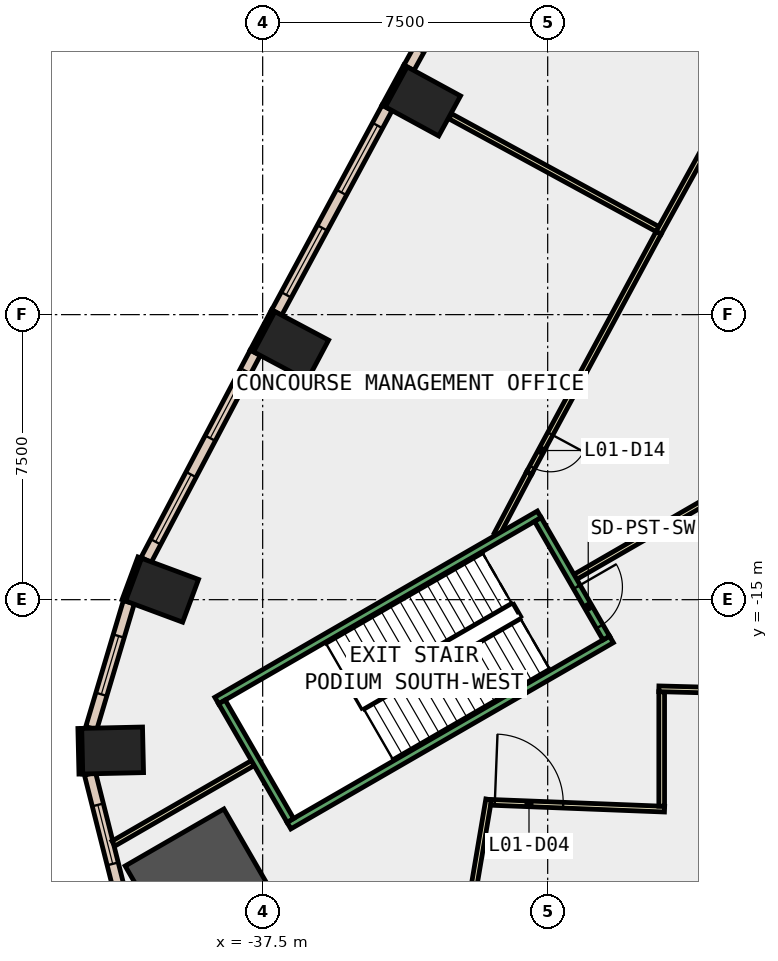
"""IFC4 building model, lengths in metres.
Left out: names, types, materials, properties, quantities, classifications, styles, units other than length and angle.
Written with IfcOpenShell. Run it as: python <this file> out.ifc"""

import sys

from ifc_helpers import new_model, si_unit, direction, frame, frame_2d, origin, origin_2d, place, context, subcontext, project, spatial, rectangle, extrude, element, fill, save


model = new_model("IFC4")
c1 = context("Model", 3, precision=1e-05, world=origin(), true_north=direction((0.0, 1.0)))
c2 = subcontext(c1, "Body", "Model", "MODEL_VIEW")
j1 = project(units=[si_unit("LENGTHUNIT", "METRE"), si_unit("PLANEANGLEUNIT", "RADIAN")], contexts=[c1])
p1 = place(None, origin())
s1 = spatial("IfcSite", under=j1, at=p1, CompositionType="ELEMENT")
p2 = place(p1, origin())
s2 = spatial("IfcBuilding", under=s1, at=p2, CompositionType="ELEMENT")
p3 = place(p2, frame((0.0, 0.0, 9.0)))
s3 = spatial("IfcBuildingStorey", under=s2, at=p3, CompositionType="ELEMENT", Elevation=9.0)
for number, where, z_axis, x_axis in (
    (1, (-33.283, -1.889, -0.45), (0.0, 0.0, 1.0), (0.478, 0.878, 0.0)),
    (2, (-36.753, -8.325, -0.45), (0.0, 0.0, 1.0), (0.469, 0.883, 0.0)),
    (3, (-40.147, -14.751, -0.45), (0.0, 0.0, 1.0), (0.348, 0.937, 0.0)),
    (4, (-41.448, -18.969, -0.45), (0.0, 0.0, 1.0), (-0.023, 1.0, 0.0)),
):
    element("IfcColumn", number, at=place(p3, frame(where, z_axis=z_axis, x_axis=x_axis)), inside=s3, PredefinedType="COLUMN", context=c2, shape_type="SweptSolid", body=[
        extrude(rectangle(XDim=1.2, YDim=1.6, at=origin_2d()), origin(), (0.0, 0.0, 1.0), 6.0),
    ])
p4 = place(p3, frame((-39.069, -22.556, -0.45), z_axis=(0.0, 0.0, 1.0), x_axis=(0.866025403784, 0.5, 0.0)))
e5 = element("IfcColumn", 5, at=p4, inside=s3, PredefinedType="COLUMN", context=c2, shape_type="SweptSolid", body=[
    extrude(rectangle(XDim=3.0, YDim=3.0, at=origin_2d()), origin(), (0.0, 0.0, 1.0), 6.0),
])
p5 = place(p3, frame((-33.742, -0.956, 0.0), z_axis=(0.0, 0.0, 1.0), x_axis=(-0.478267644701, -0.878214131082, 0.0)))
e6 = element("IfcWall", 6, at=p5, inside=s3, PredefinedType="STANDARD", context=c2, shape_type="SweptSolid", body=[
    extrude(rectangle(XDim=1.2, YDim=0.1, at=frame_2d((0.6, 0.0))), origin(), (0.0, 0.0, 1.0), 5.55),
])
p6 = place(p3, frame((-37.222, -7.397, 0.0), z_axis=(0.0, 0.0, 1.0), x_axis=(-0.469383408131, -0.882994459876, 0.0)))
e7 = element("IfcWall", 7, at=p6, inside=s3, PredefinedType="STANDARD", context=c2, shape_type="SweptSolid", body=[
    extrude(rectangle(XDim=1.199, YDim=0.1, at=frame_2d((0.6, 0.0))), origin(), (0.0, 0.0, 1.0), 5.55),
])
for number, where, z_axis, x_axis in (
    (8, (-40.735, -13.893, 0.0), (0.0, 0.0, 1.0), (-0.348, -0.937, 0.0)),
    (9, (-42.312, -18.388, 0.0), (0.0, 0.0, 1.0), (0.023, -1.0, 0.0)),
):
    element("IfcWall", number, at=place(p3, frame(where, z_axis=z_axis, x_axis=x_axis)), inside=s3, PredefinedType="STANDARD", context=c2, shape_type="SweptSolid", body=[
        extrude(rectangle(XDim=1.2, YDim=0.1, at=frame_2d((0.6, 0.0))), origin(), (0.0, 0.0, 1.0), 5.55),
    ])
p7 = place(p3, frame((-30.694, 4.353, 0.0), z_axis=(0.0, 0.0, 1.0), x_axis=(-0.483233380559, -0.875491576152, 0.0)))
e10 = element("IfcWall", 10, at=p7, inside=s3, PredefinedType="STANDARD", context=c2, shape_type="SweptSolid", body=[
    extrude(rectangle(XDim=6.121, YDim=0.3, at=frame_2d((3.061, 0.0))), origin(), (0.0, 0.0, 1.0), 5.55),
])
p8 = place(p7, frame((0.53, 0.0, 1.0)))
e11 = element("IfcOpeningElement", 11, at=p8, cuts=e10, PredefinedType="OPENING", context=c2, shape_type="SweptSolid", body=[
    extrude(rectangle(XDim=2.0, YDim=4.0, at=frame_2d((1.0, 2.0))), frame((0.0, 0.16, 0.0), z_axis=(0.0, -1.0, 0.0), x_axis=(1.0, 0.0, 0.0)), (0.0, 0.0, 1.0), 0.32),
])
p9 = place(p7, frame((3.591, 0.0, 1.0)))
e12 = element("IfcOpeningElement", 12, at=p9, cuts=e10, PredefinedType="OPENING", context=c2, shape_type="SweptSolid", body=[
    extrude(rectangle(XDim=2.0, YDim=4.0, at=frame_2d((1.0, 2.0))), frame((0.0, 0.16, 0.0), z_axis=(0.0, -1.0, 0.0), x_axis=(1.0, 0.0, 0.0)), (0.0, 0.0, 1.0), 0.32),
])
p10 = place(p3, frame((-34.226, -2.058, 0.0), z_axis=(0.0, 0.0, 1.0), x_axis=(-0.474584950749, -0.880209704856, 0.0)))
e13 = element("IfcWall", 13, at=p10, inside=s3, PredefinedType="STANDARD", context=c2, shape_type="SweptSolid", body=[
    extrude(rectangle(XDim=6.121, YDim=0.3, at=frame_2d((3.061, 0.0))), origin(), (0.0, 0.0, 1.0), 5.55),
])
p11 = place(p10, frame((0.53, 0.0, 1.0)))
e14 = element("IfcOpeningElement", 14, at=p11, cuts=e13, PredefinedType="OPENING", context=c2, shape_type="SweptSolid", body=[
    extrude(rectangle(XDim=2.0, YDim=4.0, at=frame_2d((1.0, 2.0))), frame((0.0, 0.16, 0.0), z_axis=(0.0, -1.0, 0.0), x_axis=(1.0, 0.0, 0.0)), (0.0, 0.0, 1.0), 0.32),
])
p12 = place(p10, frame((3.591, 0.0, 1.0)))
e15 = element("IfcOpeningElement", 15, at=p12, cuts=e13, PredefinedType="OPENING", context=c2, shape_type="SweptSolid", body=[
    extrude(rectangle(XDim=2.0, YDim=4.0, at=frame_2d((1.0, 2.0))), frame((0.0, 0.16, 0.0), z_axis=(0.0, -1.0, 0.0), x_axis=(1.0, 0.0, 0.0)), (0.0, 0.0, 1.0), 0.32),
])
p13 = place(p3, frame((-37.695, -8.503, 0.0), z_axis=(0.0, 0.0, 1.0), x_axis=(-0.466125129602, -0.884718804792, 0.0)))
e16 = element("IfcWall", 16, at=p13, inside=s3, PredefinedType="STANDARD", context=c2, shape_type="SweptSolid", body=[
    extrude(rectangle(XDim=6.164, YDim=0.3, at=frame_2d((3.082, 0.0))), origin(), (0.0, 0.0, 1.0), 5.55),
])
p14 = place(p13, frame((0.541, 0.0, 1.0)))
e17 = element("IfcOpeningElement", 17, at=p14, cuts=e16, PredefinedType="OPENING", context=c2, shape_type="SweptSolid", body=[
    extrude(rectangle(XDim=2.0, YDim=4.0, at=frame_2d((1.0, 2.0))), frame((0.0, 0.16, 0.0), z_axis=(0.0, -1.0, 0.0), x_axis=(1.0, 0.0, 0.0)), (0.0, 0.0, 1.0), 0.32),
])
p15 = place(p13, frame((3.623, 0.0, 1.0)))
e18 = element("IfcOpeningElement", 18, at=p15, cuts=e16, PredefinedType="OPENING", context=c2, shape_type="SweptSolid", body=[
    extrude(rectangle(XDim=2.0, YDim=4.0, at=frame_2d((1.0, 2.0))), frame((0.0, 0.16, 0.0), z_axis=(0.0, -1.0, 0.0), x_axis=(1.0, 0.0, 0.0)), (0.0, 0.0, 1.0), 0.32),
])
p16 = place(p3, frame((-41.022, -15.066, 0.0), z_axis=(0.0, 0.0, 1.0), x_axis=(-0.285800575124, -0.958289116738, 0.0)))
e19 = element("IfcWall", 19, at=p16, inside=s3, PredefinedType="STANDARD", context=c2, shape_type="SweptSolid", body=[
    extrude(rectangle(XDim=3.46, YDim=0.3, at=frame_2d((1.73, 0.0))), origin(), (0.0, 0.0, 1.0), 5.55),
])
p17 = place(p16, frame((0.93, 0.0, 1.0)))
e20 = element("IfcOpeningElement", 20, at=p17, cuts=e19, PredefinedType="OPENING", context=c2, shape_type="SweptSolid", body=[
    extrude(rectangle(XDim=1.6, YDim=4.0, at=frame_2d((0.8, 2.0))), frame((0.0, 0.16, 0.0), z_axis=(0.0, -1.0, 0.0), x_axis=(1.0, 0.0, 0.0)), (0.0, 0.0, 1.0), 0.32),
])
p18 = place(p3, frame((-42.044, -19.581, 0.0), z_axis=(0.0, 0.0, 1.0), x_axis=(0.244315836028, -0.969695711172, 0.0)))
e21 = element("IfcWall", 21, at=p18, inside=s3, PredefinedType="STANDARD", context=c2, shape_type="SweptSolid", body=[
    extrude(rectangle(XDim=3.291, YDim=0.3, at=frame_2d((1.645, 0.0))), origin(), (0.0, 0.0, 1.0), 5.55),
])
p19 = place(p18, frame((0.845, 0.0, 1.0)))
e22 = element("IfcOpeningElement", 22, at=p19, cuts=e21, PredefinedType="OPENING", context=c2, shape_type="SweptSolid", body=[
    extrude(rectangle(XDim=1.6, YDim=4.0, at=frame_2d((0.8, 2.0))), frame((0.0, 0.16, 0.0), z_axis=(0.0, -1.0, 0.0), x_axis=(1.0, 0.0, 0.0)), (0.0, 0.0, 1.0), 0.32),
])
p20 = place(p3, frame((-32.625, -26.588, 0.0), z_axis=(0.0, 0.0, 1.0), x_axis=(0.16693222012, 0.985968373674, 0.0)))
e23 = element("IfcWall", 23, at=p20, inside=s3, PredefinedType="PARTITIONING", context=c2, shape_type="SweptSolid", body=[
    extrude(rectangle(XDim=6.422, YDim=0.15, at=frame_2d((3.211, 0.0))), origin(), (0.0, 0.0, 1.0), 5.55),
])
p21 = place(p3, frame((-31.491, -20.333, 0.0), z_axis=(0.0, 0.0, 1.0), x_axis=(0.99923281192, -0.039163600211, 0.0)))
e24 = element("IfcWall", 24, at=p21, inside=s3, PredefinedType="PARTITIONING", context=c2, shape_type="SweptSolid", body=[
    extrude(rectangle(XDim=4.569, YDim=0.15, at=frame_2d((2.285, 0.0))), origin(), (0.0, 0.0, 1.0), 5.55),
])
p22 = place(p21, frame((0.1, 0.0, 0.0)))
e25 = element("IfcOpeningElement", 25, at=p22, cuts=e24, PredefinedType="OPENING", context=c2, shape_type="SweptSolid", body=[
    extrude(rectangle(XDim=1.8, YDim=2.1, at=frame_2d((0.9, 1.05))), frame((0.0, 0.085, 0.0), z_axis=(0.0, -1.0, 0.0), x_axis=(1.0, 0.0, 0.0)), (0.0, 0.0, 1.0), 0.17),
])
p23 = place(p3, frame((-27.0, -20.434, 0.0), z_axis=(0.0, 0.0, 1.0), x_axis=(0.0, 1.0, 0.0)))
e26 = element("IfcWall", 26, at=p23, inside=s3, PredefinedType="PARTITIONING", context=c2, shape_type="SweptSolid", body=[
    extrude(rectangle(XDim=3.012, YDim=0.15, at=frame_2d((1.506, 0.0))), origin(), (0.0, 0.0, 1.0), 5.55),
])
p24 = place(p3, frame((-27.075, -17.345, 0.0), z_axis=(0.0, 0.0, 1.0), x_axis=(0.999650499667, -0.026436310543, 0.0)))
e27 = element("IfcWall", 27, at=p24, inside=s3, PredefinedType="PARTITIONING", context=c2, shape_type="SweptSolid", body=[
    extrude(rectangle(XDim=8.321, YDim=0.15, at=frame_2d((4.16, 0.0))), origin(), (0.0, 0.0, 1.0), 5.55),
])
p25 = place(p3, frame((-27.047, -5.284, 0.0), z_axis=(0.0, 0.0, 1.0), x_axis=(-0.878278583626, 0.478149275377, 0.0)))
e28 = element("IfcWall", 28, at=p25, inside=s3, PredefinedType="PARTITIONING", context=c2, shape_type="SweptSolid", body=[
    extrude(rectangle(XDim=6.28, YDim=0.15, at=frame_2d((3.14, 0.0))), origin(), (0.0, 0.0, 1.0), 5.55),
])
p26 = place(p3, frame((-23.55, 1.051, 0.0), z_axis=(0.0, 0.0, 1.0), x_axis=(-0.48321416161, -0.875502183903, 0.0)))
e29 = element("IfcWall", 29, at=p26, inside=s3, PredefinedType="PARTITIONING", context=c2, shape_type="SweptSolid", body=[
    extrude(rectangle(XDim=7.311, YDim=0.15, at=frame_2d((3.656, 0.0))), origin(), (0.0, 0.0, 1.0), 5.55),
])
p27 = place(p26, frame((0.1, 0.0, 0.0)))
e30 = element("IfcOpeningElement", 30, at=p27, cuts=e29, PredefinedType="OPENING", context=c2, shape_type="SweptSolid", body=[
    extrude(rectangle(XDim=1.8, YDim=2.1, at=frame_2d((0.9, 1.05))), frame((0.0, 0.085, 0.0), z_axis=(0.0, -1.0, 0.0), x_axis=(1.0, 0.0, 0.0)), (0.0, 0.0, 1.0), 0.17),
])
p28 = place(p3, frame((-27.082, -5.35, 0.0), z_axis=(0.0, 0.0, 1.0), x_axis=(-0.474653615955, -0.880172679002, 0.0)))
e31 = element("IfcWall", 31, at=p28, inside=s3, PredefinedType="PARTITIONING", context=c2, shape_type="SweptSolid", body=[
    extrude(rectangle(XDim=7.176, YDim=0.15, at=frame_2d((3.588, 0.0))), origin(), (0.0, 0.0, 1.0), 5.55),
])
p29 = place(p28, frame((6.005, 0.0, 0.0)))
e32 = element("IfcOpeningElement", 32, at=p29, cuts=e31, PredefinedType="OPENING", context=c2, shape_type="SweptSolid", body=[
    extrude(rectangle(XDim=1.0, YDim=2.1, at=frame_2d((0.5, 1.05))), frame((0.0, 0.085, 0.0), z_axis=(0.0, -1.0, 0.0), x_axis=(1.0, 0.0, 0.0)), (0.0, 0.0, 1.0), 0.17),
])
p30 = place(p3, frame((-30.488, -11.666, 0.0), z_axis=(0.0, 0.0, 1.0), x_axis=(-0.466164290517, -0.884698171269, 0.0)))
e33 = element("IfcWall", 33, at=p30, inside=s3, PredefinedType="PARTITIONING", context=c2, shape_type="SweptSolid", body=[
    extrude(rectangle(XDim=1.83, YDim=0.15, at=frame_2d((0.915, 0.0))), origin(), (0.0, 0.0, 1.0), 5.55),
])
p31 = place(p3, frame((-37.759, -19.3, 0.0), z_axis=(0.0, 0.0, 1.0), x_axis=(-0.866003200133, -0.500038455881, 0.0)))
e34 = element("IfcWall", 34, at=p31, inside=s3, PredefinedType="PARTITIONING", context=c2, shape_type="SweptSolid", body=[
    extrude(rectangle(XDim=4.236, YDim=0.15, at=frame_2d((2.118, 0.0))), origin(), (0.0, 0.0, 1.0), 5.55),
])
p32 = place(p3, frame((-10.392, -3.5, 0.0), z_axis=(0.0, 0.0, 1.0), x_axis=(-0.866033409894, -0.499986132754, 0.0)))
e35 = element("IfcWall", 35, at=p32, inside=s3, PredefinedType="PARTITIONING", context=c2, shape_type="SweptSolid", body=[
    extrude(rectangle(XDim=21.8, YDim=0.15, at=frame_2d((10.9, 0.0))), origin(), (0.0, 0.0, 1.0), 5.55),
])
p33 = place(p32, frame((10.08, 0.0, 0.0)))
e36 = element("IfcOpeningElement", 36, at=p33, cuts=e35, PredefinedType="OPENING", context=c2, shape_type="SweptSolid", body=[
    extrude(rectangle(XDim=1.8, YDim=2.1, at=frame_2d((0.9, 1.05))), frame((0.0, 0.085, 0.0), z_axis=(0.0, -1.0, 0.0), x_axis=(1.0, 0.0, 0.0)), (0.0, 0.0, 1.0), 0.17),
])
for number, where, z_axis, x_axis in (
    (37, (-30.222, -12.755, 0.0), (0.0, 0.0, 1.0), (-0.866, -0.5, 0.0)),
    (38, (-28.322, -16.045, 0.0), (0.0, 0.0, 1.0), (-0.866, -0.5, 0.0)),
):
    element("IfcWall", number, at=place(p3, frame(where, z_axis=z_axis, x_axis=x_axis)), inside=s3, PredefinedType="STANDARD", context=c2, shape_type="SweptSolid", body=[
        extrude(rectangle(XDim=9.8, YDim=0.2, at=frame_2d((4.9, 0.0))), origin(), (0.0, 0.0, 1.0), 5.55),
    ])
p34 = place(p3, frame((-30.258, -12.891, 0.0), z_axis=(0.0, 0.0, 1.0), x_axis=(0.499982693035, -0.866035395735, 0.0)))
e39 = element("IfcWall", 39, at=p34, inside=s3, PredefinedType="STANDARD", context=c2, shape_type="SweptSolid", body=[
    extrude(rectangle(XDim=3.6, YDim=0.2, at=frame_2d((1.8, 0.0))), origin(), (0.0, 0.0, 1.0), 5.55),
])
p35 = place(p34, frame((2.05, 0.0, 0.0)))
e40 = element("IfcOpeningElement", 40, at=p35, cuts=e39, PredefinedType="OPENING", context=c2, shape_type="SweptSolid", body=[
    extrude(rectangle(XDim=1.2, YDim=2.2, at=frame_2d((0.6, 1.1))), frame((0.0, 0.11, 0.0), z_axis=(0.0, -1.0, 0.0), x_axis=(1.0, 0.0, 0.0)), (0.0, 0.0, 1.0), 0.22),
])
p36 = place(p3, frame((-38.572, -17.691, 0.0), z_axis=(0.0, 0.0, 1.0), x_axis=(0.49995333141, -0.866052346231, 0.0)))
e41 = element("IfcWall", 41, at=p36, inside=s3, PredefinedType="STANDARD", context=c2, shape_type="SweptSolid", body=[
    extrude(rectangle(XDim=3.6, YDim=0.2, at=frame_2d((1.8, 0.0))), origin(), (0.0, 0.0, 1.0), 5.55),
])
p37 = place(p11, origin())
e42 = element("IfcWindow", 42, at=p37, inside=s3, PartitioningType="SINGLE_PANEL", PredefinedType="WINDOW", context=c2, shape_type="SweptSolid", body=[
    extrude(rectangle(XDim=2.0, YDim=4.0, at=frame_2d((1.0, 2.0))), frame((0.0, 0.03, 0.0), z_axis=(0.0, -1.0, 0.0), x_axis=(1.0, 0.0, 0.0)), (0.0, 0.0, 1.0), 0.06),
])
fill(e14, e42)
p38 = place(p12, origin())
e43 = element("IfcWindow", 43, at=p38, inside=s3, PartitioningType="SINGLE_PANEL", PredefinedType="WINDOW", context=c2, shape_type="SweptSolid", body=[
    extrude(rectangle(XDim=2.0, YDim=4.0, at=frame_2d((1.0, 2.0))), frame((0.0, 0.03, 0.0), z_axis=(0.0, -1.0, 0.0), x_axis=(1.0, 0.0, 0.0)), (0.0, 0.0, 1.0), 0.06),
])
fill(e15, e43)
p39 = place(p14, origin())
e44 = element("IfcWindow", 44, at=p39, inside=s3, PartitioningType="SINGLE_PANEL", PredefinedType="WINDOW", context=c2, shape_type="SweptSolid", body=[
    extrude(rectangle(XDim=2.0, YDim=4.0, at=frame_2d((1.0, 2.0))), frame((0.0, 0.03, 0.0), z_axis=(0.0, -1.0, 0.0), x_axis=(1.0, 0.0, 0.0)), (0.0, 0.0, 1.0), 0.06),
])
fill(e17, e44)
p40 = place(p15, origin())
e45 = element("IfcWindow", 45, at=p40, inside=s3, PartitioningType="SINGLE_PANEL", PredefinedType="WINDOW", context=c2, shape_type="SweptSolid", body=[
    extrude(rectangle(XDim=2.0, YDim=4.0, at=frame_2d((1.0, 2.0))), frame((0.0, 0.03, 0.0), z_axis=(0.0, -1.0, 0.0), x_axis=(1.0, 0.0, 0.0)), (0.0, 0.0, 1.0), 0.06),
])
fill(e18, e45)
p41 = place(p17, origin())
e46 = element("IfcWindow", 46, at=p41, inside=s3, PartitioningType="SINGLE_PANEL", PredefinedType="WINDOW", context=c2, shape_type="SweptSolid", body=[
    extrude(rectangle(XDim=1.6, YDim=4.0, at=frame_2d((0.8, 2.0))), frame((0.0, 0.03, 0.0), z_axis=(0.0, -1.0, 0.0), x_axis=(1.0, 0.0, 0.0)), (0.0, 0.0, 1.0), 0.06),
])
fill(e20, e46)
p42 = place(p19, origin())
e47 = element("IfcWindow", 47, at=p42, inside=s3, PartitioningType="SINGLE_PANEL", PredefinedType="WINDOW", context=c2, shape_type="SweptSolid", body=[
    extrude(rectangle(XDim=1.6, YDim=4.0, at=frame_2d((0.8, 2.0))), frame((0.0, 0.03, 0.0), z_axis=(0.0, -1.0, 0.0), x_axis=(1.0, 0.0, 0.0)), (0.0, 0.0, 1.0), 0.06),
])
fill(e22, e47)
p43 = place(p22, origin())
e48 = element("IfcDoor", 48, at=p43, inside=s3, OperationType="DOUBLE_DOOR_SINGLE_SWING", PredefinedType="DOOR", context=c2, shape_type="SweptSolid", body=[
    extrude(rectangle(XDim=1.8, YDim=2.1, at=frame_2d((0.9, 1.05))), frame((0.0, 0.025, 0.0), z_axis=(0.0, -1.0, 0.0), x_axis=(1.0, 0.0, 0.0)), (0.0, 0.0, 1.0), 0.05),
])
fill(e25, e48)
p44 = place(p29, origin())
e49 = element("IfcDoor", 49, at=p44, inside=s3, OperationType="SINGLE_SWING_LEFT", PredefinedType="DOOR", context=c2, shape_type="SweptSolid", body=[
    extrude(rectangle(XDim=1.0, YDim=2.1, at=frame_2d((0.5, 1.05))), frame((0.0, 0.025, 0.0), z_axis=(0.0, -1.0, 0.0), x_axis=(1.0, 0.0, 0.0)), (0.0, 0.0, 1.0), 0.05),
])
fill(e32, e49)
p45 = place(p35, origin())
e50 = element("IfcDoor", 50, at=p45, inside=s3, OperationType="SINGLE_SWING_LEFT", PredefinedType="DOOR", context=c2, shape_type="SweptSolid", body=[
    extrude(rectangle(XDim=1.2, YDim=2.2, at=frame_2d((0.6, 1.1))), frame((0.0, 0.025, 0.0), z_axis=(0.0, -1.0, 0.0), x_axis=(1.0, 0.0, 0.0)), (0.0, 0.0, 1.0), 0.05),
])
fill(e40, e50)
save(model, sys.argv[1])
